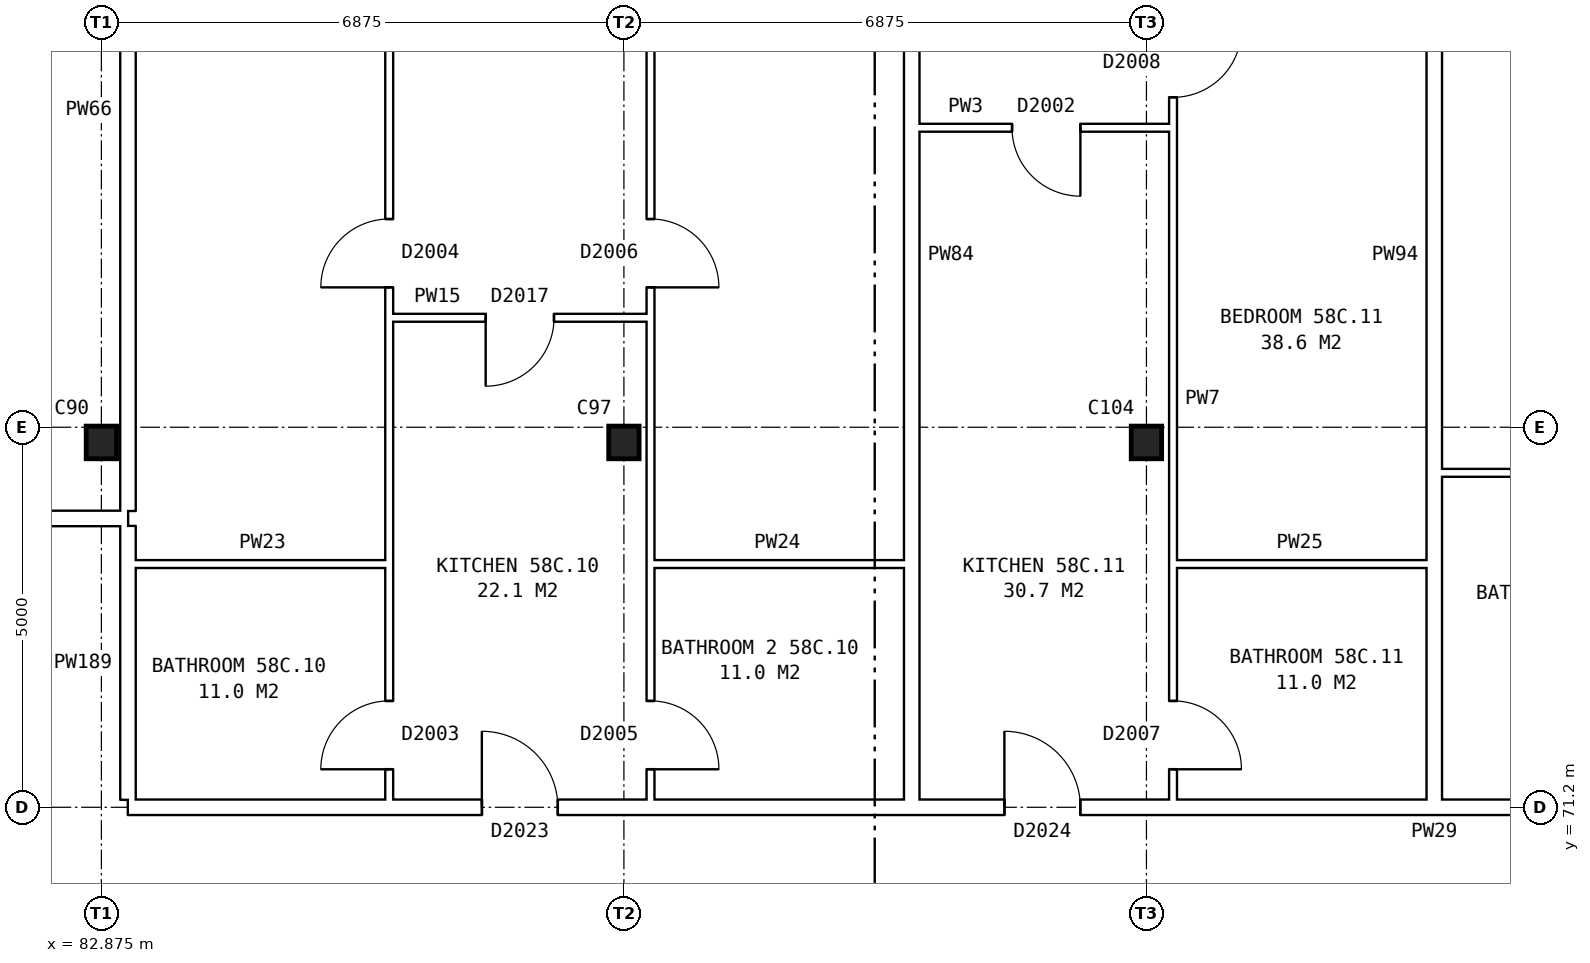
"""IFC4 building model, lengths in metres.
Left out: names, types, materials, properties, quantities, classifications, styles, units other than length and angle.
Written with IfcOpenShell. Run it as: python <this file> out.ifc"""

import sys

from ifc_helpers import new_model, si_unit, direction, frame, frame_2d, origin, origin_2d, place, context, subcontext, project, spatial, rectangle, i_section, extrude, element, fill, save


model = new_model("IFC4")
c1 = context("Model", 3, precision=1e-05, world=origin(), true_north=direction((0.0, 1.0)))
c2 = subcontext(c1, "Body", "Model", "MODEL_VIEW")
j1 = project(units=[si_unit("LENGTHUNIT", "METRE"), si_unit("PLANEANGLEUNIT", "RADIAN")], contexts=[c1])
p1 = place(None, origin())
s1 = spatial("IfcSite", under=j1, at=p1, CompositionType="ELEMENT")
p2 = place(p1, origin())
s2 = spatial("IfcBuilding", under=s1, at=p2, CompositionType="ELEMENT")
p3 = place(p2, frame((0.0, 0.0, 205.9)))
s3 = spatial("IfcBuildingStorey", under=s2, at=p3, CompositionType="ELEMENT", Elevation=205.9)
for number, where, z_axis, x_axis in (
    (1, (82.875, 76.0, 0.0), (0.0, 0.0, 1.0), (1.0, 0.0, 0.0)),
    (2, (89.75, 76.0, 0.0), (0.0, 0.0, 1.0), (1.0, 0.0, 0.0)),
    (3, (96.625, 76.0, 0.0), (0.0, 0.0, 1.0), (1.0, 0.0, 0.0)),
):
    element("IfcColumn", number, at=place(p3, frame(where, z_axis=z_axis, x_axis=x_axis)), inside=s3, PredefinedType="COLUMN", context=c2, shape_type="SweptSolid", body=[
        extrude(i_section(OverallWidth=0.4, OverallDepth=0.43, WebThickness=0.04, FlangeThickness=0.04, at=origin_2d()), origin(), (0.0, 0.0, 1.0), 2.85),
    ])
p4 = place(p3, frame((83.225, 71.2, 0.0), z_axis=(0.0, 0.0, 1.0), x_axis=(1.0, 0.0, 0.0)))
e4 = element("IfcWall", 4, at=p4, inside=s3, PredefinedType="PARTITIONING", context=c2, shape_type="SweptSolid", body=[
    extrude(rectangle(XDim=41.25, YDim=0.2, at=frame_2d((20.625, 0.0))), origin(), (0.0, 0.0, 1.0), 2.85),
])
p5 = place(p4, frame((4.656, 0.0, 0.0)))
e5 = element("IfcOpeningElement", 5, at=p5, cuts=e4, PredefinedType="OPENING", context=c2, shape_type="SweptSolid", body=[
    extrude(rectangle(XDim=1.0, YDim=2.1, at=frame_2d((0.5, 1.05))), frame((0.0, 0.11, 0.0), z_axis=(0.0, -1.0, 0.0), x_axis=(1.0, 0.0, 0.0)), (0.0, 0.0, 1.0), 0.22),
])
p6 = place(p4, frame((11.531, 0.0, 0.0)))
e6 = element("IfcOpeningElement", 6, at=p6, cuts=e4, PredefinedType="OPENING", context=c2, shape_type="SweptSolid", body=[
    extrude(rectangle(XDim=1.0, YDim=2.1, at=frame_2d((0.5, 1.05))), frame((0.0, 0.11, 0.0), z_axis=(0.0, -1.0, 0.0), x_axis=(1.0, 0.0, 0.0)), (0.0, 0.0, 1.0), 0.22),
])
p7 = place(p4, frame((21.844, 0.0, 0.0)))
e7 = element("IfcOpeningElement", 7, at=p7, cuts=e4, PredefinedType="OPENING", context=c2, shape_type="SweptSolid", body=[
    extrude(rectangle(XDim=1.0, YDim=2.1, at=frame_2d((0.5, 1.05))), frame((0.0, 0.11, 0.0), z_axis=(0.0, -1.0, 0.0), x_axis=(1.0, 0.0, 0.0)), (0.0, 0.0, 1.0), 0.22),
])
p8 = place(p4, frame((32.156, 0.0, 0.0)))
e8 = element("IfcOpeningElement", 8, at=p8, cuts=e4, PredefinedType="OPENING", context=c2, shape_type="SweptSolid", body=[
    extrude(rectangle(XDim=1.0, YDim=2.1, at=frame_2d((0.5, 1.05))), frame((0.0, 0.11, 0.0), z_axis=(0.0, -1.0, 0.0), x_axis=(1.0, 0.0, 0.0)), (0.0, 0.0, 1.0), 0.22),
])
p9 = place(p4, frame((35.594, 0.0, 0.0)))
e9 = element("IfcOpeningElement", 9, at=p9, cuts=e4, PredefinedType="OPENING", context=c2, shape_type="SweptSolid", body=[
    extrude(rectangle(XDim=1.0, YDim=2.1, at=frame_2d((0.5, 1.05))), frame((0.0, 0.11, 0.0), z_axis=(0.0, -1.0, 0.0), x_axis=(1.0, 0.0, 0.0)), (0.0, 0.0, 1.0), 0.22),
])
p10 = place(p3, frame((83.325, 74.4, 0.0), z_axis=(0.0, 0.0, 1.0), x_axis=(1.0, 0.0, 0.0)))
e10 = element("IfcWall", 10, at=p10, inside=s3, PredefinedType="PARTITIONING", context=c2, shape_type="SweptSolid", body=[
    extrude(rectangle(XDim=3.337, YDim=0.1, at=frame_2d((1.668, 0.0))), origin(), (0.0, 0.0, 1.0), 2.85),
])
for number, where, z_axis, x_axis in (
    (11, (90.1, 74.4, 0.0), (0.0, 0.0, 1.0), (1.0, 0.0, 0.0)),
    (12, (96.975, 74.4, 0.0), (0.0, 0.0, 1.0), (1.0, 0.0, 0.0)),
):
    element("IfcWall", number, at=place(p3, frame(where, z_axis=z_axis, x_axis=x_axis)), inside=s3, PredefinedType="PARTITIONING", context=c2, shape_type="SweptSolid", body=[
        extrude(rectangle(XDim=3.337, YDim=0.1, at=frame_2d((1.668, 0.0))), origin(), (0.0, 0.0, 1.0), 2.85),
    ])
p11 = place(p3, frame((75.64, 75.0, 0.0), z_axis=(0.0, 0.0, 1.0), x_axis=(1.0, 0.0, 0.0)))
e13 = element("IfcWall", 13, at=p11, inside=s3, PredefinedType="PARTITIONING", context=c2, shape_type="SweptSolid", body=[
    extrude(rectangle(XDim=7.585, YDim=0.2, at=frame_2d((3.792, 0.0))), origin(), (0.0, 0.0, 1.0), 2.85),
])
p12 = place(p11, frame((3.343, 0.0, 0.0)))
e14 = element("IfcOpeningElement", 14, at=p12, cuts=e13, PredefinedType="OPENING", context=c2, shape_type="SweptSolid", body=[
    extrude(rectangle(XDim=0.9, YDim=2.1, at=frame_2d((0.45, 1.05))), frame((0.0, 0.11, 0.0), z_axis=(0.0, -1.0, 0.0), x_axis=(1.0, 0.0, 0.0)), (0.0, 0.0, 1.0), 0.22),
])
p13 = place(p3, frame((100.512, 75.6, 0.0), z_axis=(0.0, 0.0, 1.0), x_axis=(1.0, 0.0, 0.0)))
e15 = element("IfcWall", 15, at=p13, inside=s3, PredefinedType="PARTITIONING", context=c2, shape_type="SweptSolid", body=[
    extrude(rectangle(XDim=3.338, YDim=0.1, at=frame_2d((1.669, 0.0))), origin(), (0.0, 0.0, 1.0), 2.85),
])
p14 = place(p3, frame((86.662, 77.64, 0.0), z_axis=(0.0, 0.0, 1.0), x_axis=(1.0, 0.0, 0.0)))
e16 = element("IfcWall", 16, at=p14, inside=s3, PredefinedType="PARTITIONING", context=c2, shape_type="SweptSolid", body=[
    extrude(rectangle(XDim=3.438, YDim=0.1, at=frame_2d((1.719, 0.0))), origin(), (0.0, 0.0, 1.0), 2.85),
])
p15 = place(p14, frame((1.269, 0.0, 0.0)))
e17 = element("IfcOpeningElement", 17, at=p15, cuts=e16, PredefinedType="OPENING", context=c2, shape_type="SweptSolid", body=[
    extrude(rectangle(XDim=0.9, YDim=2.1, at=frame_2d((0.45, 1.05))), frame((0.0, 0.06, 0.0), z_axis=(0.0, -1.0, 0.0), x_axis=(1.0, 0.0, 0.0)), (0.0, 0.0, 1.0), 0.12),
])
p16 = place(p3, frame((93.637, 80.14, 0.0), z_axis=(0.0, 0.0, 1.0), x_axis=(1.0, 0.0, 0.0)))
e18 = element("IfcWall", 18, at=p16, inside=s3, PredefinedType="PARTITIONING", context=c2, shape_type="SweptSolid", body=[
    extrude(rectangle(XDim=3.338, YDim=0.1, at=frame_2d((1.669, 0.0))), origin(), (0.0, 0.0, 1.0), 2.85),
])
p17 = place(p16, frame((1.219, 0.0, 0.0)))
e19 = element("IfcOpeningElement", 19, at=p17, cuts=e18, PredefinedType="OPENING", context=c2, shape_type="SweptSolid", body=[
    extrude(rectangle(XDim=0.9, YDim=2.1, at=frame_2d((0.45, 1.05))), frame((0.0, 0.06, 0.0), z_axis=(0.0, -1.0, 0.0), x_axis=(1.0, 0.0, 0.0)), (0.0, 0.0, 1.0), 0.12),
])
p18 = place(p3, frame((83.225, 71.3, 0.0), z_axis=(0.0, 0.0, 1.0), x_axis=(0.0, 1.0, 0.0)))
e20 = element("IfcWall", 20, at=p18, inside=s3, PredefinedType="PARTITIONING", context=c2, shape_type="SweptSolid", body=[
    extrude(rectangle(XDim=3.6, YDim=0.2, at=frame_2d((1.8, 0.0))), origin(), (0.0, 0.0, 1.0), 2.85),
])
p19 = place(p3, frame((83.225, 75.1, 0.0), z_axis=(0.0, 0.0, 1.0), x_axis=(0.0, 1.0, 0.0)))
e21 = element("IfcWall", 21, at=p19, inside=s3, PredefinedType="PARTITIONING", context=c2, shape_type="SweptSolid", body=[
    extrude(rectangle(XDim=10.54, YDim=0.2, at=frame_2d((5.27, 0.0))), origin(), (0.0, 0.0, 1.0), 2.85),
])
p20 = place(p3, frame((86.662, 71.3, 0.0), z_axis=(0.0, 0.0, 1.0), x_axis=(0.0, 1.0, 0.0)))
e22 = element("IfcWall", 22, at=p20, inside=s3, PredefinedType="PARTITIONING", context=c2, shape_type="SweptSolid", body=[
    extrude(rectangle(XDim=14.34, YDim=0.1, at=frame_2d((7.17, 0.0))), origin(), (0.0, 0.0, 1.0), 2.85),
])
p21 = place(p20, frame((6.74, 0.0, 0.0)))
e23 = element("IfcOpeningElement", 23, at=p21, cuts=e22, PredefinedType="OPENING", context=c2, shape_type="SweptSolid", body=[
    extrude(rectangle(XDim=0.9, YDim=2.1, at=frame_2d((0.45, 1.05))), frame((0.0, 0.06, 0.0), z_axis=(0.0, -1.0, 0.0), x_axis=(1.0, 0.0, 0.0)), (0.0, 0.0, 1.0), 0.12),
])
p22 = place(p20, frame((0.4, 0.0, 0.0)))
e24 = element("IfcOpeningElement", 24, at=p22, cuts=e22, PredefinedType="OPENING", context=c2, shape_type="SweptSolid", body=[
    extrude(rectangle(XDim=0.9, YDim=2.1, at=frame_2d((0.45, 1.05))), frame((0.0, 0.06, 0.0), z_axis=(0.0, -1.0, 0.0), x_axis=(1.0, 0.0, 0.0)), (0.0, 0.0, 1.0), 0.12),
])
p23 = place(p3, frame((90.1, 71.3, 0.0), z_axis=(0.0, 0.0, 1.0), x_axis=(0.0, 1.0, 0.0)))
e25 = element("IfcWall", 25, at=p23, inside=s3, PredefinedType="PARTITIONING", context=c2, shape_type="SweptSolid", body=[
    extrude(rectangle(XDim=14.34, YDim=0.1, at=frame_2d((7.17, 0.0))), origin(), (0.0, 0.0, 1.0), 2.85),
])
p24 = place(p23, frame((6.74, 0.0, 0.0)))
e26 = element("IfcOpeningElement", 26, at=p24, cuts=e25, PredefinedType="OPENING", context=c2, shape_type="SweptSolid", body=[
    extrude(rectangle(XDim=0.9, YDim=2.1, at=frame_2d((0.45, 1.05))), frame((0.0, 0.06, 0.0), z_axis=(0.0, -1.0, 0.0), x_axis=(1.0, 0.0, 0.0)), (0.0, 0.0, 1.0), 0.12),
])
p25 = place(p23, frame((0.4, 0.0, 0.0)))
e27 = element("IfcOpeningElement", 27, at=p25, cuts=e25, PredefinedType="OPENING", context=c2, shape_type="SweptSolid", body=[
    extrude(rectangle(XDim=0.9, YDim=2.1, at=frame_2d((0.45, 1.05))), frame((0.0, 0.06, 0.0), z_axis=(0.0, -1.0, 0.0), x_axis=(1.0, 0.0, 0.0)), (0.0, 0.0, 1.0), 0.12),
])
p26 = place(p3, frame((93.537, 71.3, 0.0), z_axis=(0.0, 0.0, 1.0), x_axis=(0.0, 1.0, 0.0)))
e28 = element("IfcWall", 28, at=p26, inside=s3, PredefinedType="PARTITIONING", context=c2, shape_type="SweptSolid", body=[
    extrude(rectangle(XDim=14.34, YDim=0.2, at=frame_2d((7.17, 0.0))), origin(), (0.0, 0.0, 1.0), 2.85),
])
p27 = place(p3, frame((96.975, 71.3, 0.0), z_axis=(0.0, 0.0, 1.0), x_axis=(0.0, 1.0, 0.0)))
e29 = element("IfcWall", 29, at=p27, inside=s3, PredefinedType="PARTITIONING", context=c2, shape_type="SweptSolid", body=[
    extrude(rectangle(XDim=14.34, YDim=0.1, at=frame_2d((7.17, 0.0))), origin(), (0.0, 0.0, 1.0), 2.85),
])
p28 = place(p27, frame((9.24, 0.0, 0.0)))
e30 = element("IfcOpeningElement", 30, at=p28, cuts=e29, PredefinedType="OPENING", context=c2, shape_type="SweptSolid", body=[
    extrude(rectangle(XDim=0.9, YDim=2.1, at=frame_2d((0.45, 1.05))), frame((0.0, 0.06, 0.0), z_axis=(0.0, -1.0, 0.0), x_axis=(1.0, 0.0, 0.0)), (0.0, 0.0, 1.0), 0.12),
])
p29 = place(p27, frame((0.4, 0.0, 0.0)))
e31 = element("IfcOpeningElement", 31, at=p29, cuts=e29, PredefinedType="OPENING", context=c2, shape_type="SweptSolid", body=[
    extrude(rectangle(XDim=0.9, YDim=2.1, at=frame_2d((0.45, 1.05))), frame((0.0, 0.06, 0.0), z_axis=(0.0, -1.0, 0.0), x_axis=(1.0, 0.0, 0.0)), (0.0, 0.0, 1.0), 0.12),
])
p30 = place(p3, frame((100.412, 71.3, 0.0), z_axis=(0.0, 0.0, 1.0), x_axis=(0.0, 1.0, 0.0)))
e32 = element("IfcWall", 32, at=p30, inside=s3, PredefinedType="PARTITIONING", context=c2, shape_type="SweptSolid", body=[
    extrude(rectangle(XDim=14.34, YDim=0.2, at=frame_2d((7.17, 0.0))), origin(), (0.0, 0.0, 1.0), 2.85),
])
p31 = place(p21, origin())
e33 = element("IfcDoor", 33, at=p31, inside=s3, OperationType="SINGLE_SWING_LEFT", PredefinedType="DOOR", context=c2, shape_type="SweptSolid", body=[
    extrude(rectangle(XDim=0.9, YDim=2.1, at=frame_2d((0.45, 1.05))), frame((0.0, 0.025, 0.0), z_axis=(0.0, -1.0, 0.0), x_axis=(1.0, 0.0, 0.0)), (0.0, 0.0, 1.0), 0.05),
])
fill(e23, e33)
p32 = place(p24, frame((0.9, 0.0, 0.0), z_axis=(0.0, 0.0, 1.0), x_axis=(-1.0, 0.0, 0.0)))
e34 = element("IfcDoor", 34, at=p32, inside=s3, OperationType="SINGLE_SWING_RIGHT", PredefinedType="DOOR", context=c2, shape_type="SweptSolid", body=[
    extrude(rectangle(XDim=0.9, YDim=2.1, at=frame_2d((0.45, 1.05))), frame((0.0, 0.025, 0.0), z_axis=(0.0, -1.0, 0.0), x_axis=(1.0, 0.0, 0.0)), (0.0, 0.0, 1.0), 0.05),
])
fill(e26, e34)
p33 = place(p5, origin())
e35 = element("IfcDoor", 35, at=p33, inside=s3, OperationType="SINGLE_SWING_LEFT", PredefinedType="DOOR", context=c2, shape_type="SweptSolid", body=[
    extrude(rectangle(XDim=1.0, YDim=2.1, at=frame_2d((0.5, 1.05))), frame((0.0, 0.025, 0.0), z_axis=(0.0, -1.0, 0.0), x_axis=(1.0, 0.0, 0.0)), (0.0, 0.0, 1.0), 0.05),
])
fill(e5, e35)
p34 = place(p15, frame((0.9, 0.0, 0.0), z_axis=(0.0, 0.0, 1.0), x_axis=(-1.0, 0.0, 0.0)))
e36 = element("IfcDoor", 36, at=p34, inside=s3, OperationType="SINGLE_SWING_RIGHT", PredefinedType="DOOR", context=c2, shape_type="SweptSolid", body=[
    extrude(rectangle(XDim=0.9, YDim=2.1, at=frame_2d((0.45, 1.05))), frame((0.0, 0.025, 0.0), z_axis=(0.0, -1.0, 0.0), x_axis=(1.0, 0.0, 0.0)), (0.0, 0.0, 1.0), 0.05),
])
fill(e17, e36)
p35 = place(p22, origin())
e37 = element("IfcDoor", 37, at=p35, inside=s3, OperationType="SINGLE_SWING_LEFT", PredefinedType="DOOR", context=c2, shape_type="SweptSolid", body=[
    extrude(rectangle(XDim=0.9, YDim=2.1, at=frame_2d((0.45, 1.05))), frame((0.0, 0.025, 0.0), z_axis=(0.0, -1.0, 0.0), x_axis=(1.0, 0.0, 0.0)), (0.0, 0.0, 1.0), 0.05),
])
fill(e24, e37)
p36 = place(p25, frame((0.9, 0.0, 0.0), z_axis=(0.0, 0.0, 1.0), x_axis=(-1.0, 0.0, 0.0)))
e38 = element("IfcDoor", 38, at=p36, inside=s3, OperationType="SINGLE_SWING_RIGHT", PredefinedType="DOOR", context=c2, shape_type="SweptSolid", body=[
    extrude(rectangle(XDim=0.9, YDim=2.1, at=frame_2d((0.45, 1.05))), frame((0.0, 0.025, 0.0), z_axis=(0.0, -1.0, 0.0), x_axis=(1.0, 0.0, 0.0)), (0.0, 0.0, 1.0), 0.05),
])
fill(e27, e38)
p37 = place(p28, frame((0.9, 0.0, 0.0), z_axis=(0.0, 0.0, 1.0), x_axis=(-1.0, 0.0, 0.0)))
e39 = element("IfcDoor", 39, at=p37, inside=s3, OperationType="SINGLE_SWING_LEFT", PredefinedType="DOOR", context=c2, shape_type="SweptSolid", body=[
    extrude(rectangle(XDim=0.9, YDim=2.1, at=frame_2d((0.45, 1.05))), frame((0.0, 0.025, 0.0), z_axis=(0.0, -1.0, 0.0), x_axis=(1.0, 0.0, 0.0)), (0.0, 0.0, 1.0), 0.05),
])
fill(e30, e39)
p38 = place(p6, origin())
e40 = element("IfcDoor", 40, at=p38, inside=s3, OperationType="SINGLE_SWING_LEFT", PredefinedType="DOOR", context=c2, shape_type="SweptSolid", body=[
    extrude(rectangle(XDim=1.0, YDim=2.1, at=frame_2d((0.5, 1.05))), frame((0.0, 0.025, 0.0), z_axis=(0.0, -1.0, 0.0), x_axis=(1.0, 0.0, 0.0)), (0.0, 0.0, 1.0), 0.05),
])
fill(e6, e40)
p39 = place(p17, frame((0.9, 0.0, 0.0), z_axis=(0.0, 0.0, 1.0), x_axis=(-1.0, 0.0, 0.0)))
e41 = element("IfcDoor", 41, at=p39, inside=s3, OperationType="SINGLE_SWING_LEFT", PredefinedType="DOOR", context=c2, shape_type="SweptSolid", body=[
    extrude(rectangle(XDim=0.9, YDim=2.1, at=frame_2d((0.45, 1.05))), frame((0.0, 0.025, 0.0), z_axis=(0.0, -1.0, 0.0), x_axis=(1.0, 0.0, 0.0)), (0.0, 0.0, 1.0), 0.05),
])
fill(e19, e41)
p40 = place(p29, frame((0.9, 0.0, 0.0), z_axis=(0.0, 0.0, 1.0), x_axis=(-1.0, 0.0, 0.0)))
e42 = element("IfcDoor", 42, at=p40, inside=s3, OperationType="SINGLE_SWING_RIGHT", PredefinedType="DOOR", context=c2, shape_type="SweptSolid", body=[
    extrude(rectangle(XDim=0.9, YDim=2.1, at=frame_2d((0.45, 1.05))), frame((0.0, 0.025, 0.0), z_axis=(0.0, -1.0, 0.0), x_axis=(1.0, 0.0, 0.0)), (0.0, 0.0, 1.0), 0.05),
])
fill(e31, e42)
save(model, sys.argv[1])
